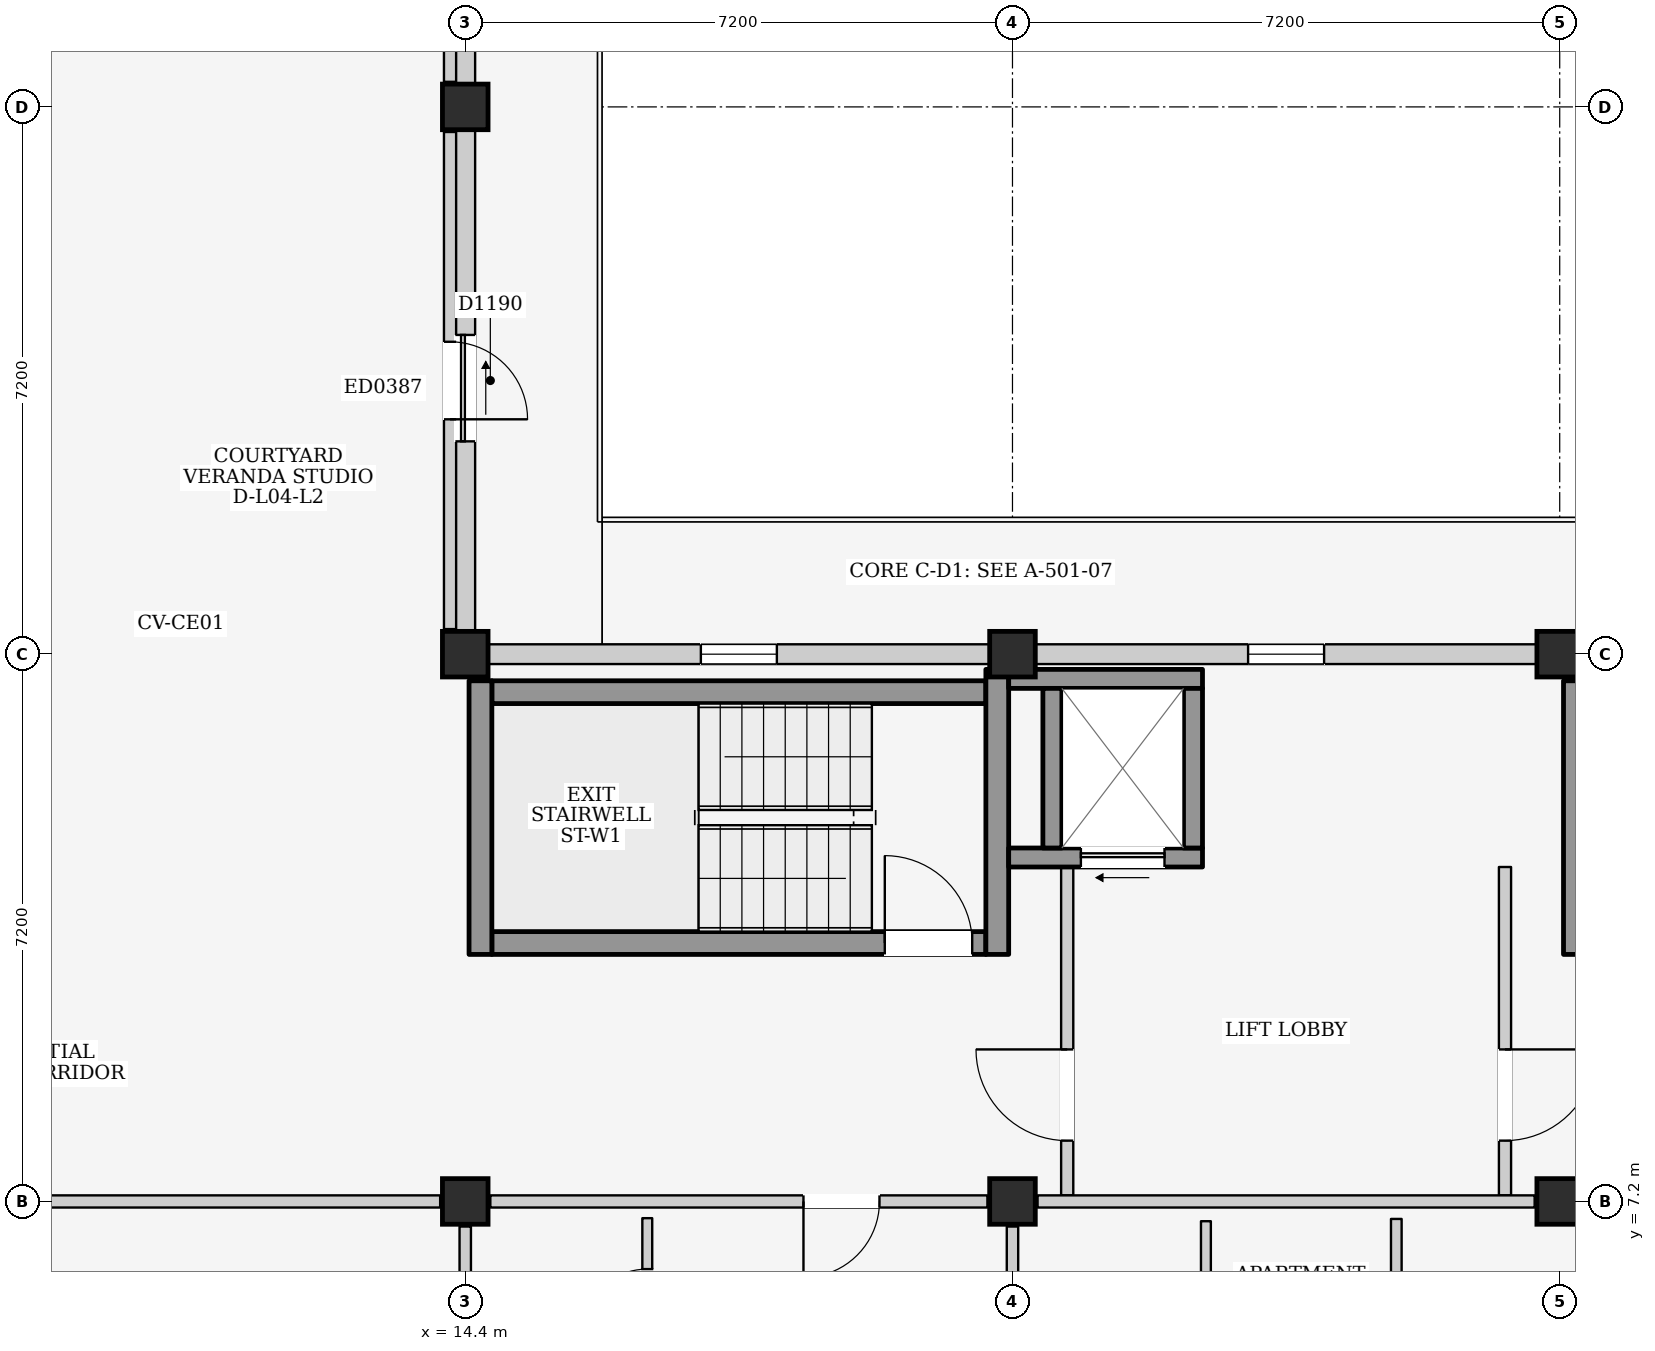
"""IFC4 building model, lengths in metres.
Left out: names, types, materials, properties, quantities, classifications, styles, units other than length and angle.
Written with IfcOpenShell. Run it as: python <this file> out.ifc"""

import sys

from ifc_helpers import new_model, si_unit, direction, frame, frame_2d, origin, origin_2d, place, context, subcontext, project, spatial, rectangle, extrude, element, fill, save


model = new_model("IFC4")
c1 = context("Model", 3, precision=1e-05, world=origin(), true_north=direction((0.0, 1.0)))
c2 = subcontext(c1, "Body", "Model", "MODEL_VIEW")
j1 = project(units=[si_unit("LENGTHUNIT", "METRE"), si_unit("PLANEANGLEUNIT", "RADIAN")], contexts=[c1])
p1 = place(None, origin())
s1 = spatial("IfcSite", under=j1, at=p1, CompositionType="ELEMENT")
p2 = place(p1, origin())
s2 = spatial("IfcBuilding", under=s1, at=p2, CompositionType="ELEMENT")
p3 = place(p2, frame((0.0, 0.0, 15.4)))
s3 = spatial("IfcBuildingStorey", under=s2, at=p3, CompositionType="ELEMENT", Elevation=15.4)
for number, where, z_axis, x_axis in (
    (1, (14.4, 7.2, 0.0), (0.0, 0.0, 1.0), (1.0, 0.0, 0.0)),
    (2, (14.4, 14.4, 0.0), (0.0, 0.0, 1.0), (1.0, 0.0, 0.0)),
    (3, (14.4, 21.6, 0.0), (0.0, 0.0, 1.0), (1.0, 0.0, 0.0)),
    (4, (21.6, 7.2, 0.0), (0.0, 0.0, 1.0), (1.0, 0.0, 0.0)),
    (5, (21.6, 14.4, 0.0), (0.0, 0.0, 1.0), (1.0, 0.0, 0.0)),
    (6, (28.8, 7.2, 0.0), (0.0, 0.0, 1.0), (1.0, 0.0, 0.0)),
    (7, (28.8, 14.4, 0.0), (0.0, 0.0, 1.0), (1.0, 0.0, 0.0)),
):
    element("IfcColumn", number, at=place(p3, frame(where, z_axis=z_axis, x_axis=x_axis)), inside=s3, PredefinedType="COLUMN", context=c2, shape_type="SweptSolid", body=[
        extrude(rectangle(XDim=0.6, YDim=0.6, at=origin_2d()), origin(), (0.0, 0.0, 1.0), 3.2),
    ])
p4 = place(p3, frame((14.4, 14.7, 0.0), z_axis=(0.0, 0.0, 1.0), x_axis=(0.0, 1.0, 0.0)))
e8 = element("IfcWall", 8, at=p4, inside=s3, PredefinedType="ELEMENTEDWALL", context=c2, shape_type="SweptSolid", body=[
    extrude(rectangle(XDim=6.6, YDim=0.26, at=frame_2d((3.3, 0.0))), origin(), (0.0, 0.0, 1.0), 2.385),
])
p5 = place(p4, frame((2.5, 0.0, 0.0)))
e9 = element("IfcOpeningElement", 9, at=p5, cuts=e8, PredefinedType="OPENING", context=c2, shape_type="SweptSolid", body=[
    extrude(rectangle(XDim=1.4, YDim=2.1, at=frame_2d((0.7, 1.05))), frame((0.0, 0.145, 0.0), z_axis=(0.0, -1.0, 0.0), x_axis=(1.0, 0.0, 0.0)), (0.0, 0.0, 1.0), 0.29),
])
p6 = place(p3, frame((14.4, 21.9, 0.0), z_axis=(0.0, 0.0, 1.0), x_axis=(0.0, 1.0, 0.0)))
e10 = element("IfcWall", 10, at=p6, inside=s3, PredefinedType="ELEMENTEDWALL", context=c2, shape_type="SweptSolid", body=[
    extrude(rectangle(XDim=6.6, YDim=0.26, at=frame_2d((3.3, 0.0))), origin(), (0.0, 0.0, 1.0), 2.385),
])
p7 = place(p6, frame((2.5, 0.0, 0.0)))
e11 = element("IfcOpeningElement", 11, at=p7, cuts=e10, PredefinedType="OPENING", context=c2, shape_type="SweptSolid", body=[
    extrude(rectangle(XDim=1.4, YDim=2.1, at=frame_2d((0.7, 1.05))), frame((0.0, 0.145, 0.0), z_axis=(0.0, -1.0, 0.0), x_axis=(1.0, 0.0, 0.0)), (0.0, 0.0, 1.0), 0.29),
])
p8 = place(p3, frame((14.7, 14.4, 0.0), z_axis=(0.0, 0.0, 1.0), x_axis=(1.0, 0.0, 0.0)))
e12 = element("IfcWall", 12, at=p8, inside=s3, PredefinedType="ELEMENTEDWALL", context=c2, shape_type="SweptSolid", body=[
    extrude(rectangle(XDim=6.6, YDim=0.26, at=frame_2d((3.3, 0.0))), origin(), (0.0, 0.0, 1.0), 2.335),
])
p9 = place(p8, frame((2.8, 0.0, 1.2)))
e13 = element("IfcOpeningElement", 13, at=p9, cuts=e12, PredefinedType="OPENING", context=c2, shape_type="SweptSolid", body=[
    extrude(rectangle(XDim=1.0, YDim=0.9, at=frame_2d((0.5, 0.45))), frame((0.0, 0.145, 0.0), z_axis=(0.0, -1.0, 0.0), x_axis=(1.0, 0.0, 0.0)), (0.0, 0.0, 1.0), 0.29),
])
p10 = place(p3, frame((21.9, 14.4, 0.0), z_axis=(0.0, 0.0, 1.0), x_axis=(1.0, 0.0, 0.0)))
e14 = element("IfcWall", 14, at=p10, inside=s3, PredefinedType="ELEMENTEDWALL", context=c2, shape_type="SweptSolid", body=[
    extrude(rectangle(XDim=6.6, YDim=0.26, at=frame_2d((3.3, 0.0))), origin(), (0.0, 0.0, 1.0), 2.335),
])
p11 = place(p10, frame((2.8, 0.0, 1.2)))
e15 = element("IfcOpeningElement", 15, at=p11, cuts=e14, PredefinedType="OPENING", context=c2, shape_type="SweptSolid", body=[
    extrude(rectangle(XDim=1.0, YDim=0.9, at=frame_2d((0.5, 0.45))), frame((0.0, 0.145, 0.0), z_axis=(0.0, -1.0, 0.0), x_axis=(1.0, 0.0, 0.0)), (0.0, 0.0, 1.0), 0.29),
])
p12 = place(p3, frame((14.75, 10.6, 0.0), z_axis=(0.0, 0.0, 1.0), x_axis=(1.0, 0.0, 0.0)))
e16 = element("IfcWall", 16, at=p12, inside=s3, PredefinedType="SHEAR", context=c2, shape_type="SweptSolid", body=[
    extrude(rectangle(XDim=6.5, YDim=0.3, at=frame_2d((3.25, 0.0))), origin(), (0.0, 0.0, 1.0), 2.95),
])
p13 = place(p12, frame((5.17, 0.0, 0.0)))
e17 = element("IfcOpeningElement", 17, at=p13, cuts=e16, PredefinedType="OPENING", context=c2, shape_type="SweptSolid", body=[
    extrude(rectangle(XDim=1.15, YDim=2.2, at=frame_2d((0.575, 1.1))), frame((0.0, 0.165, 0.0), z_axis=(0.0, -1.0, 0.0), x_axis=(1.0, 0.0, 0.0)), (0.0, 0.0, 1.0), 0.33),
])
p14 = place(p3, frame((14.75, 13.9, 0.0), z_axis=(0.0, 0.0, 1.0), x_axis=(1.0, 0.0, 0.0)))
e18 = element("IfcWall", 18, at=p14, inside=s3, PredefinedType="SHEAR", context=c2, shape_type="SweptSolid", body=[
    extrude(rectangle(XDim=6.5, YDim=0.3, at=frame_2d((3.25, 0.0))), origin(), (0.0, 0.0, 1.0), 2.95),
])
p15 = place(p3, frame((14.6, 10.45, 0.0), z_axis=(0.0, 0.0, 1.0), x_axis=(0.0, 1.0, 0.0)))
e19 = element("IfcWall", 19, at=p15, inside=s3, PredefinedType="SHEAR", context=c2, shape_type="SweptSolid", body=[
    extrude(rectangle(XDim=3.6, YDim=0.3, at=frame_2d((1.8, 0.0))), origin(), (0.0, 0.0, 1.0), 2.95),
])
p16 = place(p3, frame((21.4, 10.45, 0.0), z_axis=(0.0, 0.0, 1.0), x_axis=(0.0, 1.0, 0.0)))
e20 = element("IfcWall", 20, at=p16, inside=s3, PredefinedType="SHEAR", context=c2, shape_type="SweptSolid", body=[
    extrude(rectangle(XDim=3.75, YDim=0.3, at=frame_2d((1.875, 0.0))), origin(), (0.0, 0.0, 1.0), 2.95),
])
p17 = place(p3, frame((22.32, 7.28, 0.0), z_axis=(0.0, 0.0, 1.0), x_axis=(0.0, 1.0, 0.0)))
e21 = element("IfcWall", 21, at=p17, inside=s3, PredefinedType="PARTITIONING", context=c2, shape_type="SweptSolid", body=[
    extrude(rectangle(XDim=4.32, YDim=0.16, at=frame_2d((2.16, 0.0))), origin(), (0.0, 0.0, 1.0), 2.95),
])
p18 = place(p17, frame((0.72, 0.0, 0.0)))
e22 = element("IfcOpeningElement", 22, at=p18, cuts=e21, PredefinedType="OPENING", context=c2, shape_type="SweptSolid", body=[
    extrude(rectangle(XDim=1.2, YDim=2.2, at=frame_2d((0.6, 1.1))), frame((0.0, 0.095, 0.0), z_axis=(0.0, -1.0, 0.0), x_axis=(1.0, 0.0, 0.0)), (0.0, 0.0, 1.0), 0.19),
])
p19 = place(p3, frame((28.08, 7.28, 0.0), z_axis=(0.0, 0.0, 1.0), x_axis=(0.0, 1.0, 0.0)))
e23 = element("IfcWall", 23, at=p19, inside=s3, PredefinedType="PARTITIONING", context=c2, shape_type="SweptSolid", body=[
    extrude(rectangle(XDim=4.32, YDim=0.16, at=frame_2d((2.16, 0.0))), origin(), (0.0, 0.0, 1.0), 2.95),
])
p20 = place(p19, frame((0.72, 0.0, 0.0)))
e24 = element("IfcOpeningElement", 24, at=p20, cuts=e23, PredefinedType="OPENING", context=c2, shape_type="SweptSolid", body=[
    extrude(rectangle(XDim=1.2, YDim=2.2, at=frame_2d((0.6, 1.1))), frame((0.0, 0.095, 0.0), z_axis=(0.0, -1.0, 0.0), x_axis=(1.0, 0.0, 0.0)), (0.0, 0.0, 1.0), 0.19),
])
p21 = place(p3, frame((21.55, 11.725, 0.0), z_axis=(0.0, 0.0, 1.0), x_axis=(1.0, 0.0, 0.0)))
e25 = element("IfcWall", 25, at=p21, inside=s3, PredefinedType="SHEAR", context=c2, shape_type="SweptSolid", body=[
    extrude(rectangle(XDim=2.55, YDim=0.25, at=frame_2d((1.275, 0.0))), origin(), (0.0, 0.0, 1.0), 2.95),
])
p22 = place(p21, frame((0.95, 0.0, 0.0)))
e26 = element("IfcOpeningElement", 26, at=p22, cuts=e25, PredefinedType="OPENING", context=c2, shape_type="SweptSolid", body=[
    extrude(rectangle(XDim=1.1, YDim=2.15, at=frame_2d((0.55, 1.075))), frame((0.0, 0.14, 0.0), z_axis=(0.0, -1.0, 0.0), x_axis=(1.0, 0.0, 0.0)), (0.0, 0.0, 1.0), 0.28),
])
p23 = place(p3, frame((21.55, 14.075, 0.0), z_axis=(0.0, 0.0, 1.0), x_axis=(1.0, 0.0, 0.0)))
e27 = element("IfcWall", 27, at=p23, inside=s3, PredefinedType="SHEAR", context=c2, shape_type="SweptSolid", body=[
    extrude(rectangle(XDim=2.55, YDim=0.25, at=frame_2d((1.275, 0.0))), origin(), (0.0, 0.0, 1.0), 2.95),
])
for number, where, z_axis, x_axis in (
    (28, (22.125, 11.85, 0.0), (0.0, 0.0, 1.0), (0.0, 1.0, 0.0)),
    (29, (23.975, 11.85, 0.0), (0.0, 0.0, 1.0), (0.0, 1.0, 0.0)),
):
    element("IfcWall", number, at=place(p3, frame(where, z_axis=z_axis, x_axis=x_axis)), inside=s3, PredefinedType="SHEAR", context=c2, shape_type="SweptSolid", body=[
        extrude(rectangle(XDim=2.1, YDim=0.25, at=frame_2d((1.05, 0.0))), origin(), (0.0, 0.0, 1.0), 2.95),
    ])
p24 = place(p3, frame((29.0, 10.45, 0.0), z_axis=(0.0, 0.0, 1.0), x_axis=(0.0, 1.0, 0.0)))
e30 = element("IfcWall", 30, at=p24, inside=s3, PredefinedType="SHEAR", context=c2, shape_type="SweptSolid", body=[
    extrude(rectangle(XDim=3.6, YDim=0.3, at=frame_2d((1.8, 0.0))), origin(), (0.0, 0.0, 1.0), 2.95),
])
p25 = place(p3, frame((7.53, 7.2, 0.0), z_axis=(0.0, 0.0, 1.0), x_axis=(1.0, 0.0, 0.0)))
e31 = element("IfcWall", 31, at=p25, inside=s3, PredefinedType="PARTITIONING", context=c2, shape_type="SweptSolid", body=[
    extrude(rectangle(XDim=6.54, YDim=0.16, at=frame_2d((3.27, 0.0))), origin(), (0.0, 0.0, 1.0), 2.335),
])
p26 = place(p3, frame((14.4, 0.33, 0.0), z_axis=(0.0, 0.0, 1.0), x_axis=(0.0, 1.0, 0.0)))
e32 = element("IfcWall", 32, at=p26, inside=s3, PredefinedType="PARTITIONING", context=c2, shape_type="SweptSolid", body=[
    extrude(rectangle(XDim=6.54, YDim=0.15, at=frame_2d((3.27, 0.0))), origin(), (0.0, 0.0, 1.0), 2.385),
])
p27 = place(p3, frame((14.73, 7.2, 0.0), z_axis=(0.0, 0.0, 1.0), x_axis=(1.0, 0.0, 0.0)))
e33 = element("IfcWall", 33, at=p27, inside=s3, PredefinedType="PARTITIONING", context=c2, shape_type="SweptSolid", body=[
    extrude(rectangle(XDim=6.54, YDim=0.16, at=frame_2d((3.27, 0.0))), origin(), (0.0, 0.0, 1.0), 2.335),
])
p28 = place(p27, frame((4.12, 0.0, 0.0)))
e34 = element("IfcOpeningElement", 34, at=p28, cuts=e33, PredefinedType="OPENING", context=c2, shape_type="SweptSolid", body=[
    extrude(rectangle(XDim=1.0, YDim=2.15, at=frame_2d((0.5, 1.075))), frame((0.0, 0.095, 0.0), z_axis=(0.0, -1.0, 0.0), x_axis=(1.0, 0.0, 0.0)), (0.0, 0.0, 1.0), 0.19),
])
p29 = place(p3, frame((21.6, 0.33, 0.0), z_axis=(0.0, 0.0, 1.0), x_axis=(0.0, 1.0, 0.0)))
e35 = element("IfcWall", 35, at=p29, inside=s3, PredefinedType="PARTITIONING", context=c2, shape_type="SweptSolid", body=[
    extrude(rectangle(XDim=6.54, YDim=0.15, at=frame_2d((3.27, 0.0))), origin(), (0.0, 0.0, 1.0), 2.385),
])
p30 = place(p3, frame((16.795, 4.76, 0.0), z_axis=(0.0, 0.0, 1.0), x_axis=(0.0, 1.0, 0.0)))
e36 = element("IfcWall", 36, at=p30, inside=s3, PredefinedType="PARTITIONING", context=c2, shape_type="SweptSolid", body=[
    extrude(rectangle(XDim=2.22, YDim=0.13, at=frame_2d((1.11, 0.0))), origin(), (0.0, 0.0, 1.0), 2.95),
])
p31 = place(p30, frame((0.67, 0.0, 0.0)))
e37 = element("IfcOpeningElement", 37, at=p31, cuts=e36, PredefinedType="OPENING", context=c2, shape_type="SweptSolid", body=[
    extrude(rectangle(XDim=0.88, YDim=2.1, at=frame_2d((0.44, 1.05))), frame((0.0, 0.08, 0.0), z_axis=(0.0, -1.0, 0.0), x_axis=(1.0, 0.0, 0.0)), (0.0, 0.0, 1.0), 0.16),
])
p32 = place(p3, frame((21.93, 7.2, 0.0), z_axis=(0.0, 0.0, 1.0), x_axis=(1.0, 0.0, 0.0)))
e38 = element("IfcWall", 38, at=p32, inside=s3, PredefinedType="PARTITIONING", context=c2, shape_type="SweptSolid", body=[
    extrude(rectangle(XDim=6.54, YDim=0.16, at=frame_2d((3.27, 0.0))), origin(), (0.0, 0.0, 1.0), 2.335),
])
p33 = place(p3, frame((24.145, 3.9, 0.0), z_axis=(0.0, 0.0, 1.0), x_axis=(0.0, 1.0, 0.0)))
e39 = element("IfcWall", 39, at=p33, inside=s3, PredefinedType="PARTITIONING", context=c2, shape_type="SweptSolid", body=[
    extrude(rectangle(XDim=3.04, YDim=0.13, at=frame_2d((1.52, 0.0))), origin(), (0.0, 0.0, 1.0), 2.95),
])
p34 = place(p3, frame((26.65, 3.91, 0.0), z_axis=(0.0, 0.0, 1.0), x_axis=(0.0, 1.0, 0.0)))
e40 = element("IfcWall", 40, at=p34, inside=s3, PredefinedType="PARTITIONING", context=c2, shape_type="SweptSolid", body=[
    extrude(rectangle(XDim=3.06, YDim=0.14, at=frame_2d((1.53, 0.0))), origin(), (0.0, 0.0, 1.0), 2.95),
])
p35 = place(p3, frame((14.2, 14.73, 0.0), z_axis=(0.0, 0.0, 1.0), x_axis=(0.0, 1.0, 0.0)))
e41 = element("IfcWall", 41, at=p35, inside=s3, PredefinedType="PARTITIONING", context=c2, shape_type="SweptSolid", body=[
    extrude(rectangle(XDim=6.54, YDim=0.16, at=frame_2d((3.27, 0.0))), origin(), (0.0, 0.0, 1.0), 2.385),
])
p36 = place(p35, frame((2.76, 0.0, 0.0)))
e42 = element("IfcOpeningElement", 42, at=p36, cuts=e41, PredefinedType="OPENING", context=c2, shape_type="SweptSolid", body=[
    extrude(rectangle(XDim=1.02, YDim=2.18, at=frame_2d((0.51, 1.09))), frame((0.0, 0.095, 0.0), z_axis=(0.0, -1.0, 0.0), x_axis=(1.0, 0.0, 0.0)), (0.0, 0.0, 1.0), 0.19),
])
p37 = place(p3, frame((14.2, 21.93, 0.0), z_axis=(0.0, 0.0, 1.0), x_axis=(0.0, 1.0, 0.0)))
e43 = element("IfcWall", 43, at=p37, inside=s3, PredefinedType="PARTITIONING", context=c2, shape_type="SweptSolid", body=[
    extrude(rectangle(XDim=6.54, YDim=0.16, at=frame_2d((3.27, 0.0))), origin(), (0.0, 0.0, 1.0), 2.385),
])
p38 = place(p37, frame((2.76, 0.0, 0.0)))
e44 = element("IfcOpeningElement", 44, at=p38, cuts=e43, PredefinedType="OPENING", context=c2, shape_type="SweptSolid", body=[
    extrude(rectangle(XDim=1.02, YDim=2.18, at=frame_2d((0.51, 1.09))), frame((0.0, 0.095, 0.0), z_axis=(0.0, -1.0, 0.0), x_axis=(1.0, 0.0, 0.0)), (0.0, 0.0, 1.0), 0.19),
])
p39 = place(p5, frame((1.4, 0.0, 0.0), z_axis=(0.0, 0.0, 1.0), x_axis=(-1.0, 0.0, 0.0)))
e45 = element("IfcDoor", 45, at=p39, inside=s3, OperationType="SLIDING_TO_RIGHT", PredefinedType="DOOR", context=c2, shape_type="SweptSolid", body=[
    extrude(rectangle(XDim=1.4, YDim=2.1, at=frame_2d((0.7, 1.05))), frame((0.0, 0.025, 0.0), z_axis=(0.0, -1.0, 0.0), x_axis=(1.0, 0.0, 0.0)), (0.0, 0.0, 1.0), 0.05),
])
fill(e9, e45)
p40 = place(p9, origin())
e46 = element("IfcWindow", 46, at=p40, inside=s3, PartitioningType="SINGLE_PANEL", PredefinedType="WINDOW", context=c2, shape_type="SweptSolid", body=[
    extrude(rectangle(XDim=1.0, YDim=0.9, at=frame_2d((0.5, 0.45))), frame((0.0, 0.03, 0.0), z_axis=(0.0, -1.0, 0.0), x_axis=(1.0, 0.0, 0.0)), (0.0, 0.0, 1.0), 0.06),
])
fill(e13, e46)
p41 = place(p11, origin())
e47 = element("IfcWindow", 47, at=p41, inside=s3, PartitioningType="SINGLE_PANEL", PredefinedType="WINDOW", context=c2, shape_type="SweptSolid", body=[
    extrude(rectangle(XDim=1.0, YDim=0.9, at=frame_2d((0.5, 0.45))), frame((0.0, 0.03, 0.0), z_axis=(0.0, -1.0, 0.0), x_axis=(1.0, 0.0, 0.0)), (0.0, 0.0, 1.0), 0.06),
])
fill(e15, e47)
p42 = place(p13, origin())
e48 = element("IfcDoor", 48, at=p42, inside=s3, OperationType="SINGLE_SWING_LEFT", PredefinedType="DOOR", context=c2, shape_type="SweptSolid", body=[
    extrude(rectangle(XDim=1.15, YDim=2.2, at=frame_2d((0.575, 1.1))), frame((0.0, 0.025, 0.0), z_axis=(0.0, -1.0, 0.0), x_axis=(1.0, 0.0, 0.0)), (0.0, 0.0, 1.0), 0.05),
])
fill(e17, e48)
p43 = place(p18, origin())
e49 = element("IfcDoor", 49, at=p43, inside=s3, OperationType="SINGLE_SWING_RIGHT", PredefinedType="DOOR", context=c2, shape_type="SweptSolid", body=[
    extrude(rectangle(XDim=1.2, YDim=2.2, at=frame_2d((0.6, 1.1))), frame((0.0, 0.025, 0.0), z_axis=(0.0, -1.0, 0.0), x_axis=(1.0, 0.0, 0.0)), (0.0, 0.0, 1.0), 0.05),
])
fill(e22, e49)
p44 = place(p20, frame((1.2, 0.0, 0.0), z_axis=(0.0, 0.0, 1.0), x_axis=(-1.0, 0.0, 0.0)))
e50 = element("IfcDoor", 50, at=p44, inside=s3, OperationType="SINGLE_SWING_LEFT", PredefinedType="DOOR", context=c2, shape_type="SweptSolid", body=[
    extrude(rectangle(XDim=1.2, YDim=2.2, at=frame_2d((0.6, 1.1))), frame((0.0, 0.025, 0.0), z_axis=(0.0, -1.0, 0.0), x_axis=(1.0, 0.0, 0.0)), (0.0, 0.0, 1.0), 0.05),
])
fill(e24, e50)
p45 = place(p22, frame((1.1, 0.0, 0.0), z_axis=(0.0, 0.0, 1.0), x_axis=(-1.0, 0.0, 0.0)))
e51 = element("IfcDoor", 51, at=p45, inside=s3, OperationType="SLIDING_TO_LEFT", PredefinedType="DOOR", context=c2, shape_type="SweptSolid", body=[
    extrude(rectangle(XDim=1.1, YDim=2.15, at=frame_2d((0.55, 1.075))), frame((0.0, 0.025, 0.0), z_axis=(0.0, -1.0, 0.0), x_axis=(1.0, 0.0, 0.0)), (0.0, 0.0, 1.0), 0.05),
])
fill(e26, e51)
p46 = place(p28, frame((1.0, 0.0, 0.0), z_axis=(0.0, 0.0, 1.0), x_axis=(-1.0, 0.0, 0.0)))
e52 = element("IfcDoor", 52, at=p46, inside=s3, OperationType="SINGLE_SWING_RIGHT", PredefinedType="DOOR", context=c2, shape_type="SweptSolid", body=[
    extrude(rectangle(XDim=1.0, YDim=2.15, at=frame_2d((0.5, 1.075))), frame((0.0, 0.025, 0.0), z_axis=(0.0, -1.0, 0.0), x_axis=(1.0, 0.0, 0.0)), (0.0, 0.0, 1.0), 0.05),
])
fill(e34, e52)
p47 = place(p31, origin())
e53 = element("IfcDoor", 53, at=p47, inside=s3, OperationType="SINGLE_SWING_LEFT", PredefinedType="DOOR", context=c2, shape_type="SweptSolid", body=[
    extrude(rectangle(XDim=0.88, YDim=2.1, at=frame_2d((0.44, 1.05))), frame((0.0, 0.025, 0.0), z_axis=(0.0, -1.0, 0.0), x_axis=(1.0, 0.0, 0.0)), (0.0, 0.0, 1.0), 0.05),
])
fill(e37, e53)
p48 = place(p36, frame((1.02, 0.0, 0.0), z_axis=(0.0, 0.0, 1.0), x_axis=(-1.0, 0.0, 0.0)))
e54 = element("IfcDoor", 54, at=p48, inside=s3, OperationType="SINGLE_SWING_RIGHT", PredefinedType="DOOR", context=c2, shape_type="SweptSolid", body=[
    extrude(rectangle(XDim=1.02, YDim=2.18, at=frame_2d((0.51, 1.09))), frame((0.0, 0.025, 0.0), z_axis=(0.0, -1.0, 0.0), x_axis=(1.0, 0.0, 0.0)), (0.0, 0.0, 1.0), 0.05),
])
fill(e42, e54)
save(model, sys.argv[1])
